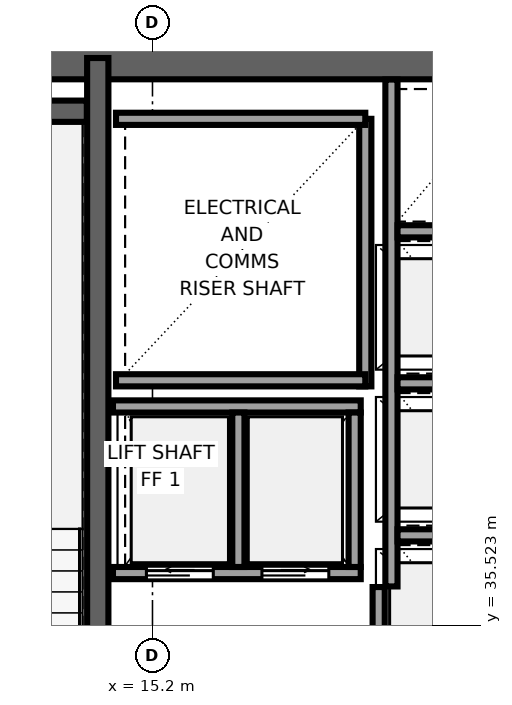
"""IFC4 building model, lengths in metres.
Left out: names, types, materials, properties, quantities, classifications, styles, units other than length and angle.
Written with IfcOpenShell. Run it as: python <this file> out.ifc"""

import sys

from ifc_helpers import new_model, si_unit, direction, frame, frame_2d, origin, place, context, subcontext, project, spatial, rectangle, extrude, source, transform, mapped, element, fill, save


model = new_model("IFC4")
c1 = context("Model", 3, precision=1e-05, world=origin(), true_north=direction((0.0, 1.0)))
c2 = subcontext(c1, "Body", "Model", "MODEL_VIEW")
j1 = project(units=[si_unit("LENGTHUNIT", "METRE"), si_unit("PLANEANGLEUNIT", "RADIAN")], contexts=[c1])
p1 = place(None, origin())
s1 = spatial("IfcSite", under=j1, at=p1, CompositionType="ELEMENT")
p2 = place(p1, origin())
s2 = spatial("IfcBuilding", under=s1, at=p2, CompositionType="ELEMENT")
p3 = place(p2, frame((0.0, 0.0, 100.9)))
s3 = spatial("IfcBuildingStorey", under=s2, at=p3, CompositionType="ELEMENT", Elevation=100.9)
p4 = place(p3, frame((9.8, 44.85, 0.0), z_axis=(0.0, 0.0, 1.0), x_axis=(1.0, 0.0, 0.0)))
e1 = element("IfcWall", 1, at=p4, inside=s3, PredefinedType="SHEAR", context=c2, shape_type="SweptSolid", body=[
    extrude(rectangle(XDim=26.4, YDim=0.7, at=frame_2d((13.2, 0.0))), origin(), (0.0, 0.0, 1.0), 3.55),
])
p5 = place(p3, frame((14.3, 31.95, 0.0), z_axis=(0.0, 0.0, 1.0), x_axis=(0.0, 1.0, 0.0)))
e2 = element("IfcWall", 2, at=p5, inside=s3, PredefinedType="SHEAR", context=c2, shape_type="SweptSolid", body=[
    extrude(rectangle(XDim=12.9, YDim=0.35, at=frame_2d((6.45, 0.0))), origin(), (0.0, 0.0, 1.0), 3.55),
])
p6 = place(p5, frame((0.6, 0.0, 0.0)))
e3 = element("IfcOpeningElement", 3, at=p6, cuts=e2, PredefinedType="OPENING", context=c2, shape_type="SweptSolid", body=[
    extrude(rectangle(XDim=1.1, YDim=2.12, at=frame_2d((0.55, 1.06))), frame((0.0, 0.185, 0.0), z_axis=(0.0, -1.0, 0.0), x_axis=(1.0, 0.0, 0.0)), (0.0, 0.0, 1.0), 0.37),
])
p7 = place(p3, frame((10.52, 43.975, 0.0), z_axis=(0.0, 0.0, 1.0), x_axis=(1.0, 0.0, 0.0)))
e4 = element("IfcWall", 4, at=p7, inside=s3, PredefinedType="SHEAR", context=c2, shape_type="SweptSolid", body=[
    extrude(rectangle(XDim=3.6, YDim=0.35, at=frame_2d((1.8, 0.0))), origin(), (0.0, 0.0, 1.0), 3.55),
])
p8 = place(p3, frame((18.7, 39.45, 0.0), z_axis=(0.0, 0.0, 1.0), x_axis=(0.0, 1.0, 0.0)))
e5 = element("IfcWall", 5, at=p8, inside=s3, PredefinedType="SOLIDWALL", context=c2, shape_type="SweptSolid", body=[
    extrude(rectangle(XDim=4.4, YDim=0.2, at=frame_2d((2.2, 0.0))), origin(), (0.0, 0.0, 1.0), 3.37),
])
for number, where, z_axis, x_axis in (
    (6, (14.6, 39.55, 0.0), (0.0, 0.0, 1.0), (1.0, 0.0, 0.0)),
    (7, (14.6, 43.85, 0.0), (0.0, 0.0, 1.0), (1.0, 0.0, 0.0)),
):
    element("IfcWall", number, at=place(p3, frame(where, z_axis=z_axis, x_axis=x_axis)), inside=s3, PredefinedType="SOLIDWALL", context=c2, shape_type="SweptSolid", body=[
        extrude(rectangle(XDim=4.1, YDim=0.2, at=frame_2d((2.05, 0.0))), origin(), (0.0, 0.0, 1.0), 3.37),
    ])
p9 = place(p3, frame((18.92, 32.304, 0.0), z_axis=(0.0, 0.0, 1.0), x_axis=(0.0, 1.0, 0.0)))
e8 = element("IfcWall", 8, at=p9, inside=s3, PredefinedType="SOLIDWALL", context=c2, shape_type="SweptSolid", body=[
    extrude(rectangle(XDim=3.846, YDim=0.2, at=frame_2d((1.923, 0.0))), origin(), (0.0, 0.0, 1.0), 3.37),
])
p10 = place(p3, frame((19.13, 36.16, 0.0), z_axis=(0.0, 0.0, 1.0), x_axis=(0.0, 1.0, 0.0)))
e9 = element("IfcWall", 9, at=p10, inside=s3, PredefinedType="SOLIDWALL", context=c2, shape_type="SweptSolid", body=[
    extrude(rectangle(XDim=8.336, YDim=0.2, at=frame_2d((4.168, 0.0))), origin(), (0.0, 0.0, 1.0), 3.37),
])
for number, where, z_axis, x_axis in (
    (10, (19.23, 37.0, 0.0), (0.0, 0.0, 1.0), (1.0, 0.0, 0.0)),
    (11, (19.23, 39.5, 0.0), (0.0, 0.0, 1.0), (1.0, 0.0, 0.0)),
    (12, (19.23, 42.0, 0.0), (0.0, 0.0, 1.0), (1.0, 0.0, 0.0)),
):
    element("IfcWall", number, at=place(p3, frame(where, z_axis=z_axis, x_axis=x_axis)), inside=s3, PredefinedType="SOLIDWALL", context=c2, shape_type="SweptSolid", body=[
        extrude(rectangle(XDim=1.84, YDim=0.2, at=frame_2d((0.92, 0.0))), origin(), (0.0, 0.0, 1.0), 3.37),
    ])
p11 = place(p3, frame((14.55, 36.38, 0.0), z_axis=(0.0, 0.0, 1.0), x_axis=(1.0, 0.0, 0.0)))
e13 = element("IfcWall", 13, at=p11, inside=s3, PredefinedType="SOLIDWALL", context=c2, shape_type="SweptSolid", body=[
    extrude(rectangle(XDim=4.075, YDim=0.2, at=frame_2d((2.038, 0.0))), origin(), (0.0, 0.0, 1.0), 3.37),
])
p12 = place(p11, frame((0.55, 0.0, 0.0)))
e14 = element("IfcOpeningElement", 14, at=p12, cuts=e13, PredefinedType="OPENING", context=c2, shape_type="SweptSolid", body=[
    extrude(rectangle(XDim=1.1, YDim=2.12, at=frame_2d((0.55, 1.06))), frame((0.0, 0.11, 0.0), z_axis=(0.0, -1.0, 0.0), x_axis=(1.0, 0.0, 0.0)), (0.0, 0.0, 1.0), 0.22),
])
p13 = place(p11, frame((2.45, 0.0, 0.0)))
e15 = element("IfcOpeningElement", 15, at=p13, cuts=e13, PredefinedType="OPENING", context=c2, shape_type="SweptSolid", body=[
    extrude(rectangle(XDim=1.1, YDim=2.12, at=frame_2d((0.55, 1.06))), frame((0.0, 0.11, 0.0), z_axis=(0.0, -1.0, 0.0), x_axis=(1.0, 0.0, 0.0)), (0.0, 0.0, 1.0), 0.22),
])
p14 = place(p3, frame((14.55, 39.12, 0.0), z_axis=(0.0, 0.0, 1.0), x_axis=(1.0, 0.0, 0.0)))
e16 = element("IfcWall", 16, at=p14, inside=s3, PredefinedType="SOLIDWALL", context=c2, shape_type="SweptSolid", body=[
    extrude(rectangle(XDim=4.075, YDim=0.2, at=frame_2d((2.038, 0.0))), origin(), (0.0, 0.0, 1.0), 3.37),
])
for number, where, z_axis, x_axis in (
    (17, (18.525, 36.48, 0.0), (0.0, 0.0, 1.0), (0.0, 1.0, 0.0)),
    (18, (16.613, 36.48, 0.0), (0.0, 0.0, 1.0), (0.0, 1.0, 0.0)),
):
    element("IfcWall", number, at=place(p3, frame(where, z_axis=z_axis, x_axis=x_axis)), inside=s3, PredefinedType="SOLIDWALL", context=c2, shape_type="SweptSolid", body=[
        extrude(rectangle(XDim=2.54, YDim=0.2, at=frame_2d((1.27, 0.0))), origin(), (0.0, 0.0, 1.0), 3.37),
    ])
m1 = source(origin(), c2, "Body", "SweptSolid", [
    extrude(rectangle(XDim=1.1, YDim=2.12, at=frame_2d((0.55, 1.06))), frame((0.0, 0.025, 0.0), z_axis=(0.0, -1.0, 0.0), x_axis=(1.0, 0.0, 0.0)), (0.0, 0.0, 1.0), 0.05),
])
p15 = place(p12, origin())
e19 = element("IfcDoor", 19, at=p15, inside=s3, OperationType="SLIDING_TO_LEFT", PredefinedType="DOOR", context=c2, shape_type="MappedRepresentation", body=[
    mapped(m1, transform((0.0, 0.0, 0.0), x_axis=(1.0, 0.0, 0.0), y_axis=(0.0, 1.0, 0.0), z_axis=(0.0, 0.0, 1.0), scale=1.0)),
])
fill(e14, e19)
p16 = place(p13, origin())
e20 = element("IfcDoor", 20, at=p16, inside=s3, OperationType="SLIDING_TO_RIGHT", PredefinedType="DOOR", context=c2, shape_type="MappedRepresentation", body=[
    mapped(m1, transform((0.0, 0.0, 0.0), x_axis=(1.0, 0.0, 0.0), y_axis=(0.0, 1.0, 0.0), z_axis=(0.0, 0.0, 1.0), scale=1.0)),
])
fill(e15, e20)
save(model, sys.argv[1])
